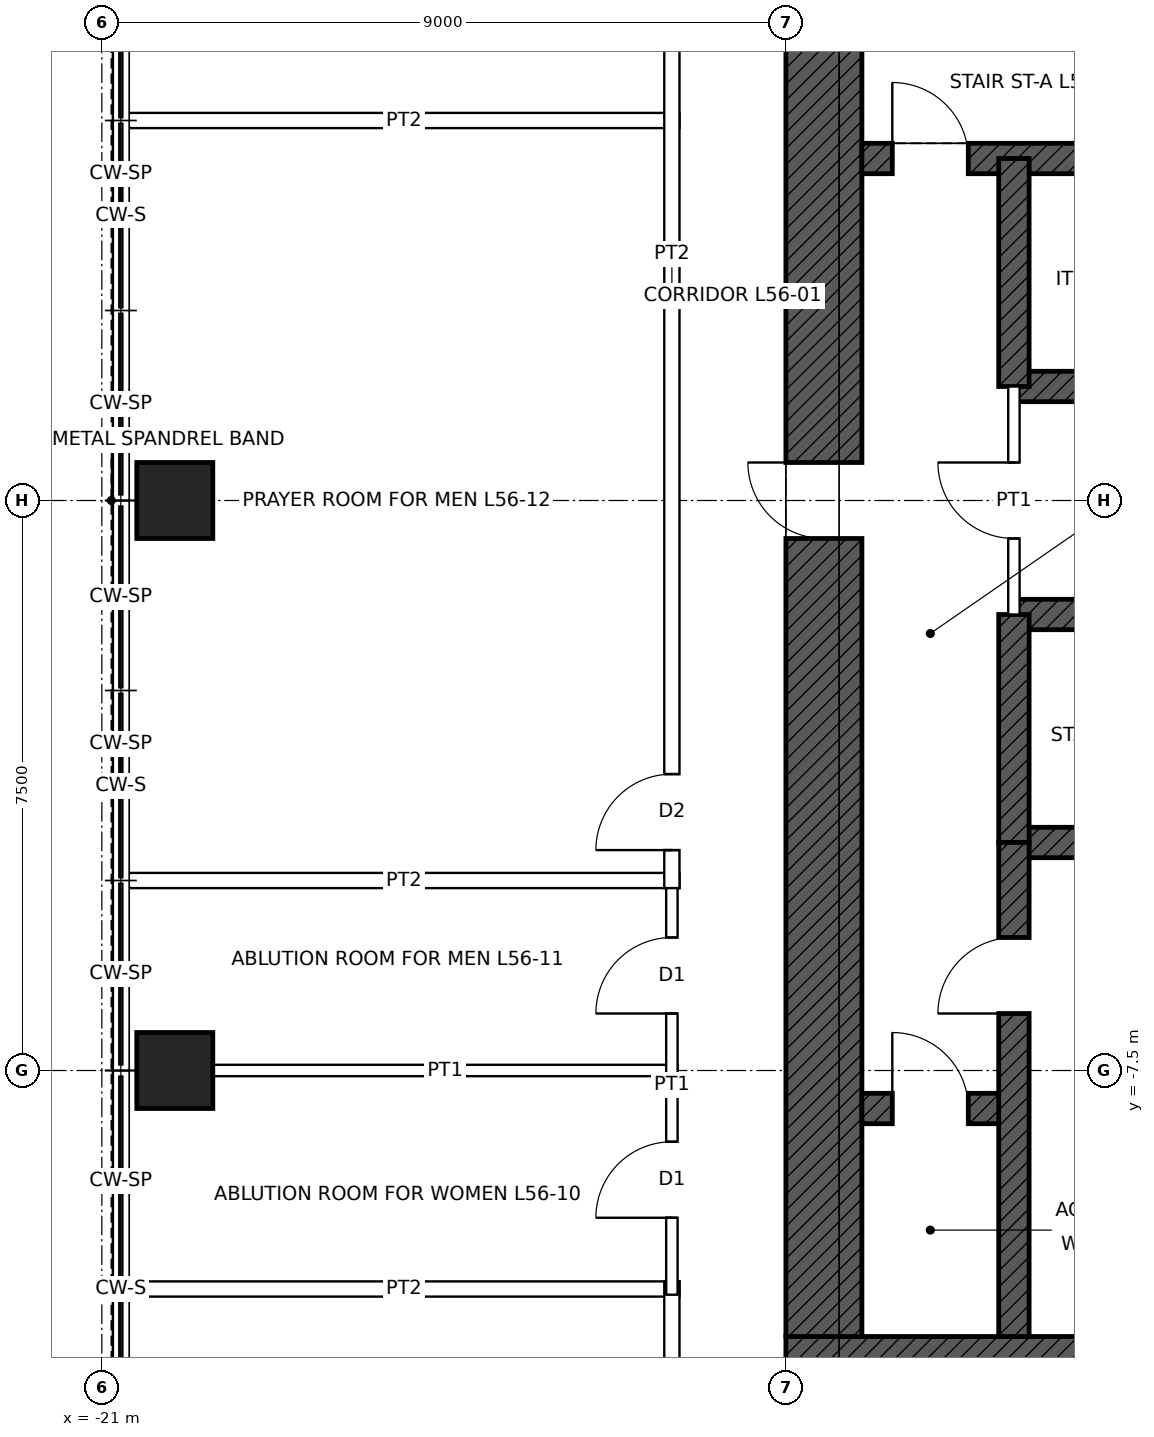
"""IFC4 building model, lengths in metres.
Left out: names, types, materials, properties, quantities, classifications, styles, units other than length and angle.
Written with IfcOpenShell. Run it as: python <this file> out.ifc"""

import sys

from ifc_helpers import new_model, si_unit, direction, frame, frame_2d, origin, origin_2d, place, context, subcontext, project, spatial, rectangle, hollow_rectangle, extrude, element, fill, save


model = new_model("IFC4")
c1 = context("Model", 3, precision=1e-05, world=origin(), true_north=direction((0.0, 1.0)))
c2 = subcontext(c1, "Body", "Model", "MODEL_VIEW")
j1 = project(units=[si_unit("LENGTHUNIT", "METRE"), si_unit("PLANEANGLEUNIT", "RADIAN")], contexts=[c1])
p1 = place(None, origin())
s1 = spatial("IfcSite", under=j1, at=p1, CompositionType="ELEMENT")
p2 = place(p1, origin())
s2 = spatial("IfcBuilding", under=s1, at=p2, CompositionType="ELEMENT")
p3 = place(p2, frame((0.0, 0.0, 259.9)))
s3 = spatial("IfcBuildingStorey", under=s2, at=p3, CompositionType="ELEMENT", Elevation=259.9)
for number, where, z_axis, x_axis in (
    (1, (-20.04, -7.5, 0.0), (0.0, 0.0, 1.0), (1.0, 0.0, 0.0)),
    (2, (-20.04, 0.0, 0.0), (0.0, 0.0, 1.0), (1.0, 0.0, 0.0)),
):
    element("IfcColumn", number, at=place(p3, frame(where, z_axis=z_axis, x_axis=x_axis)), inside=s3, PredefinedType="COLUMN", context=c2, shape_type="SweptSolid", body=[
        extrude(hollow_rectangle(XDim=1.0, YDim=1.0, WallThickness=0.075, at=origin_2d()), origin(), (0.0, 0.0, 1.0), 4.0),
    ])
p4 = place(p3, frame((12.0, -11.5, 0.0), z_axis=(0.0, 0.0, 1.0), x_axis=(-1.0, 0.0, 0.0)))
e3 = element("IfcWall", 3, at=p4, inside=s3, PredefinedType="SHEAR", context=c2, shape_type="SweptSolid", body=[
    extrude(rectangle(XDim=24.0, YDim=1.0, at=frame_2d((12.0, 0.0))), origin(), (0.0, 0.0, 1.0), 4.0),
])
p5 = place(p4, frame((11.5, 0.0, 0.0)))
e4 = element("IfcOpeningElement", 4, at=p5, cuts=e3, PredefinedType="OPENING", context=c2, shape_type="SweptSolid", body=[
    extrude(rectangle(XDim=1.0, YDim=2.1, at=frame_2d((0.5, 1.05))), frame((0.0, 0.51, 0.0), z_axis=(0.0, -1.0, 0.0), x_axis=(1.0, 0.0, 0.0)), (0.0, 0.0, 1.0), 1.02),
])
p6 = place(p4, frame((1.0, 0.0, 0.0)))
e5 = element("IfcOpeningElement", 5, at=p6, cuts=e3, PredefinedType="OPENING", context=c2, shape_type="SweptSolid", body=[
    extrude(rectangle(XDim=1.0, YDim=2.4, at=frame_2d((0.5, 1.2))), frame((0.0, 0.51, 0.0), z_axis=(0.0, -1.0, 0.0), x_axis=(1.0, 0.0, 0.0)), (0.0, 0.0, 1.0), 1.02),
])
p7 = place(p3, frame((-11.5, -11.0, 0.0), z_axis=(0.0, 0.0, 1.0), x_axis=(0.0, 1.0, 0.0)))
e6 = element("IfcWall", 6, at=p7, inside=s3, PredefinedType="SHEAR", context=c2, shape_type="SweptSolid", body=[
    extrude(rectangle(XDim=22.0, YDim=1.0, at=frame_2d((11.0, 0.0))), origin(), (0.0, 0.0, 1.0), 4.0),
])
p8 = place(p7, frame((10.5, 0.0, 0.0)))
e7 = element("IfcOpeningElement", 7, at=p8, cuts=e6, PredefinedType="OPENING", context=c2, shape_type="SweptSolid", body=[
    extrude(rectangle(XDim=1.0, YDim=2.4, at=frame_2d((0.5, 1.2))), frame((0.0, 0.51, 0.0), z_axis=(0.0, -1.0, 0.0), x_axis=(1.0, 0.0, 0.0)), (0.0, 0.0, 1.0), 1.02),
])
p9 = place(p3, frame((-11.0, 4.5, 0.0), z_axis=(0.0, 0.0, 1.0), x_axis=(1.0, 0.0, 0.0)))
e8 = element("IfcWall", 8, at=p9, inside=s3, PredefinedType="SHEAR", context=c2, shape_type="SweptSolid", body=[
    extrude(rectangle(XDim=22.0, YDim=0.4, at=frame_2d((11.0, 0.0))), origin(), (0.0, 0.0, 1.0), 4.0),
])
p10 = place(p9, frame((0.4, 0.0, 0.0)))
e9 = element("IfcOpeningElement", 9, at=p10, cuts=e8, PredefinedType="OPENING", context=c2, shape_type="SweptSolid", body=[
    extrude(rectangle(XDim=1.0, YDim=2.1, at=frame_2d((0.5, 1.05))), frame((0.0, 0.21, 0.0), z_axis=(0.0, -1.0, 0.0), x_axis=(1.0, 0.0, 0.0)), (0.0, 0.0, 1.0), 0.42),
])
p11 = place(p9, frame((20.6, 0.0, 0.0)))
e10 = element("IfcOpeningElement", 10, at=p11, cuts=e8, PredefinedType="OPENING", context=c2, shape_type="SweptSolid", body=[
    extrude(rectangle(XDim=1.0, YDim=2.1, at=frame_2d((0.5, 1.05))), frame((0.0, 0.21, 0.0), z_axis=(0.0, -1.0, 0.0), x_axis=(1.0, 0.0, 0.0)), (0.0, 0.0, 1.0), 0.42),
])
p12 = place(p3, frame((-9.0, 1.5, 0.0), z_axis=(0.0, 0.0, 1.0), x_axis=(1.0, 0.0, 0.0)))
e11 = element("IfcWall", 11, at=p12, inside=s3, PredefinedType="SHEAR", context=c2, shape_type="SweptSolid", body=[
    extrude(rectangle(XDim=18.0, YDim=0.4, at=frame_2d((9.0, 0.0))), origin(), (0.0, 0.0, 1.0), 4.0),
])
p13 = place(p12, frame((0.95, 0.0, 0.0)))
e12 = element("IfcOpeningElement", 12, at=p13, cuts=e11, PredefinedType="OPENING", context=c2, shape_type="SweptSolid", body=[
    extrude(rectangle(XDim=1.1, YDim=2.1, at=frame_2d((0.55, 1.05))), frame((0.0, 0.21, 0.0), z_axis=(0.0, -1.0, 0.0), x_axis=(1.0, 0.0, 0.0)), (0.0, 0.0, 1.0), 0.42),
])
p14 = place(p12, frame((3.95, 0.0, 0.0)))
e13 = element("IfcOpeningElement", 13, at=p14, cuts=e11, PredefinedType="OPENING", context=c2, shape_type="SweptSolid", body=[
    extrude(rectangle(XDim=1.1, YDim=2.1, at=frame_2d((0.55, 1.05))), frame((0.0, 0.21, 0.0), z_axis=(0.0, -1.0, 0.0), x_axis=(1.0, 0.0, 0.0)), (0.0, 0.0, 1.0), 0.42),
])
p15 = place(p12, frame((6.95, 0.0, 0.0)))
e14 = element("IfcOpeningElement", 14, at=p15, cuts=e11, PredefinedType="OPENING", context=c2, shape_type="SweptSolid", body=[
    extrude(rectangle(XDim=1.1, YDim=2.1, at=frame_2d((0.55, 1.05))), frame((0.0, 0.21, 0.0), z_axis=(0.0, -1.0, 0.0), x_axis=(1.0, 0.0, 0.0)), (0.0, 0.0, 1.0), 0.42),
])
p16 = place(p12, frame((9.95, 0.0, 0.0)))
e15 = element("IfcOpeningElement", 15, at=p16, cuts=e11, PredefinedType="OPENING", context=c2, shape_type="SweptSolid", body=[
    extrude(rectangle(XDim=1.1, YDim=2.1, at=frame_2d((0.55, 1.05))), frame((0.0, 0.21, 0.0), z_axis=(0.0, -1.0, 0.0), x_axis=(1.0, 0.0, 0.0)), (0.0, 0.0, 1.0), 0.42),
])
p17 = place(p12, frame((12.95, 0.0, 0.0)))
e16 = element("IfcOpeningElement", 16, at=p17, cuts=e11, PredefinedType="OPENING", context=c2, shape_type="SweptSolid", body=[
    extrude(rectangle(XDim=1.1, YDim=2.1, at=frame_2d((0.55, 1.05))), frame((0.0, 0.21, 0.0), z_axis=(0.0, -1.0, 0.0), x_axis=(1.0, 0.0, 0.0)), (0.0, 0.0, 1.0), 0.42),
])
p18 = place(p12, frame((15.95, 0.0, 0.0)))
e17 = element("IfcOpeningElement", 17, at=p18, cuts=e11, PredefinedType="OPENING", context=c2, shape_type="SweptSolid", body=[
    extrude(rectangle(XDim=1.1, YDim=2.1, at=frame_2d((0.55, 1.05))), frame((0.0, 0.21, 0.0), z_axis=(0.0, -1.0, 0.0), x_axis=(1.0, 0.0, 0.0)), (0.0, 0.0, 1.0), 0.42),
])
p19 = place(p3, frame((-9.0, -1.5, 0.0), z_axis=(0.0, 0.0, 1.0), x_axis=(1.0, 0.0, 0.0)))
e18 = element("IfcWall", 18, at=p19, inside=s3, PredefinedType="SHEAR", context=c2, shape_type="SweptSolid", body=[
    extrude(rectangle(XDim=18.0, YDim=0.4, at=frame_2d((9.0, 0.0))), origin(), (0.0, 0.0, 1.0), 4.0),
])
p20 = place(p19, frame((9.95, 0.0, 0.0)))
e19 = element("IfcOpeningElement", 19, at=p20, cuts=e18, PredefinedType="OPENING", context=c2, shape_type="SweptSolid", body=[
    extrude(rectangle(XDim=1.1, YDim=2.1, at=frame_2d((0.55, 1.05))), frame((0.0, 0.21, 0.0), z_axis=(0.0, -1.0, 0.0), x_axis=(1.0, 0.0, 0.0)), (0.0, 0.0, 1.0), 0.42),
])
p21 = place(p19, frame((12.95, 0.0, 0.0)))
e20 = element("IfcOpeningElement", 20, at=p21, cuts=e18, PredefinedType="OPENING", context=c2, shape_type="SweptSolid", body=[
    extrude(rectangle(XDim=1.1, YDim=2.1, at=frame_2d((0.55, 1.05))), frame((0.0, 0.21, 0.0), z_axis=(0.0, -1.0, 0.0), x_axis=(1.0, 0.0, 0.0)), (0.0, 0.0, 1.0), 0.42),
])
p22 = place(p19, frame((15.95, 0.0, 0.0)))
e21 = element("IfcOpeningElement", 21, at=p22, cuts=e18, PredefinedType="OPENING", context=c2, shape_type="SweptSolid", body=[
    extrude(rectangle(XDim=1.1, YDim=2.1, at=frame_2d((0.55, 1.05))), frame((0.0, 0.21, 0.0), z_axis=(0.0, -1.0, 0.0), x_axis=(1.0, 0.0, 0.0)), (0.0, 0.0, 1.0), 0.42),
])
p23 = place(p19, frame((0.95, 0.0, 0.0)))
e22 = element("IfcOpeningElement", 22, at=p23, cuts=e18, PredefinedType="OPENING", context=c2, shape_type="SweptSolid", body=[
    extrude(rectangle(XDim=1.1, YDim=2.1, at=frame_2d((0.55, 1.05))), frame((0.0, 0.21, 0.0), z_axis=(0.0, -1.0, 0.0), x_axis=(1.0, 0.0, 0.0)), (0.0, 0.0, 1.0), 0.42),
])
p24 = place(p19, frame((3.95, 0.0, 0.0)))
e23 = element("IfcOpeningElement", 23, at=p24, cuts=e18, PredefinedType="OPENING", context=c2, shape_type="SweptSolid", body=[
    extrude(rectangle(XDim=1.1, YDim=2.1, at=frame_2d((0.55, 1.05))), frame((0.0, 0.21, 0.0), z_axis=(0.0, -1.0, 0.0), x_axis=(1.0, 0.0, 0.0)), (0.0, 0.0, 1.0), 0.42),
])
p25 = place(p19, frame((6.95, 0.0, 0.0)))
e24 = element("IfcOpeningElement", 24, at=p25, cuts=e18, PredefinedType="OPENING", context=c2, shape_type="SweptSolid", body=[
    extrude(rectangle(XDim=1.1, YDim=2.1, at=frame_2d((0.55, 1.05))), frame((0.0, 0.21, 0.0), z_axis=(0.0, -1.0, 0.0), x_axis=(1.0, 0.0, 0.0)), (0.0, 0.0, 1.0), 0.42),
])
p26 = place(p3, frame((-9.0, -4.5, 0.0), z_axis=(0.0, 0.0, 1.0), x_axis=(1.0, 0.0, 0.0)))
e25 = element("IfcWall", 25, at=p26, inside=s3, PredefinedType="SHEAR", context=c2, shape_type="SweptSolid", body=[
    extrude(rectangle(XDim=18.0, YDim=0.4, at=frame_2d((9.0, 0.0))), origin(), (0.0, 0.0, 1.0), 4.0),
])
p27 = place(p3, frame((-11.0, -8.0, 0.0), z_axis=(0.0, 0.0, 1.0), x_axis=(1.0, 0.0, 0.0)))
e26 = element("IfcWall", 26, at=p27, inside=s3, PredefinedType="SHEAR", context=c2, shape_type="SweptSolid", body=[
    extrude(rectangle(XDim=2.0, YDim=0.4, at=frame_2d((1.0, 0.0))), origin(), (0.0, 0.0, 1.0), 4.0),
])
p28 = place(p27, frame((0.4, 0.0, 0.0)))
e27 = element("IfcOpeningElement", 27, at=p28, cuts=e26, PredefinedType="OPENING", context=c2, shape_type="SweptSolid", body=[
    extrude(rectangle(XDim=1.0, YDim=2.1, at=frame_2d((0.5, 1.05))), frame((0.0, 0.21, 0.0), z_axis=(0.0, -1.0, 0.0), x_axis=(1.0, 0.0, 0.0)), (0.0, 0.0, 1.0), 0.42),
])
for number, where, z_axis, x_axis in (
    (28, (-9.0, 1.5, 0.0), (0.0, 0.0, 1.0), (0.0, 1.0, 0.0)),
    (29, (-9.0, -4.5, 0.0), (0.0, 0.0, 1.0), (0.0, 1.0, 0.0)),
):
    element("IfcWall", number, at=place(p3, frame(where, z_axis=z_axis, x_axis=x_axis)), inside=s3, PredefinedType="SHEAR", context=c2, shape_type="SweptSolid", body=[
        extrude(rectangle(XDim=3.0, YDim=0.4, at=frame_2d((1.5, 0.0))), origin(), (0.0, 0.0, 1.0), 4.0),
    ])
p29 = place(p3, frame((-9.0, -11.0, 0.0), z_axis=(0.0, 0.0, 1.0), x_axis=(0.0, 1.0, 0.0)))
e30 = element("IfcWall", 30, at=p29, inside=s3, PredefinedType="SHEAR", context=c2, shape_type="SweptSolid", body=[
    extrude(rectangle(XDim=6.5, YDim=0.4, at=frame_2d((3.25, 0.0))), origin(), (0.0, 0.0, 1.0), 4.0),
])
p30 = place(p29, frame((4.25, 0.0, 0.0)))
e31 = element("IfcOpeningElement", 31, at=p30, cuts=e30, PredefinedType="OPENING", context=c2, shape_type="SweptSolid", body=[
    extrude(rectangle(XDim=1.0, YDim=2.1, at=frame_2d((0.5, 1.05))), frame((0.0, 0.21, 0.0), z_axis=(0.0, -1.0, 0.0), x_axis=(1.0, 0.0, 0.0)), (0.0, 0.0, 1.0), 0.42),
])
p31 = place(p3, frame((-20.65, -10.375, 0.0), z_axis=(0.0, 0.0, 1.0), x_axis=(1.0, 0.0, 0.0)))
e32 = element("IfcWall", 32, at=p31, inside=s3, PredefinedType="PARTITIONING", context=c2, shape_type="SweptSolid", body=[
    extrude(rectangle(XDim=7.25, YDim=0.2, at=frame_2d((3.625, 0.0))), origin(), (0.0, 0.0, 1.0), 3.85),
])
p32 = place(p3, frame((-19.54, -7.5, 0.0), z_axis=(0.0, 0.0, 1.0), x_axis=(1.0, 0.0, 0.0)))
e33 = element("IfcWall", 33, at=p32, inside=s3, PredefinedType="PARTITIONING", context=c2, shape_type="SweptSolid", body=[
    extrude(rectangle(XDim=6.115, YDim=0.15, at=frame_2d((3.058, 0.0))), origin(), (0.0, 0.0, 1.0), 3.243),
])
for number, where, z_axis, x_axis in (
    (34, (-20.65, -5.0, 0.0), (0.0, 0.0, 1.0), (1.0, 0.0, 0.0)),
    (35, (-20.65, 5.0, 0.0), (0.0, 0.0, 1.0), (1.0, 0.0, 0.0)),
):
    element("IfcWall", number, at=place(p3, frame(where, z_axis=z_axis, x_axis=x_axis)), inside=s3, PredefinedType="PARTITIONING", context=c2, shape_type="SweptSolid", body=[
        extrude(rectangle(XDim=7.25, YDim=0.2, at=frame_2d((3.625, 0.0))), origin(), (0.0, 0.0, 1.0), 3.85),
    ])
p33 = place(p3, frame((-13.5, -13.6, 0.0), z_axis=(0.0, 0.0, 1.0), x_axis=(0.0, 1.0, 0.0)))
e36 = element("IfcWall", 36, at=p33, inside=s3, PredefinedType="PARTITIONING", context=c2, shape_type="SweptSolid", body=[
    extrude(rectangle(XDim=3.325, YDim=0.2, at=frame_2d((1.663, 0.0))), origin(), (0.0, 0.0, 1.0), 3.85),
])
p34 = place(p3, frame((-13.5, -10.45, 0.0), z_axis=(0.0, 0.0, 1.0), x_axis=(0.0, 1.0, 0.0)))
e37 = element("IfcWall", 37, at=p34, inside=s3, PredefinedType="PARTITIONING", context=c2, shape_type="SweptSolid", body=[
    extrude(rectangle(XDim=5.525, YDim=0.15, at=frame_2d((2.762, 0.0))), origin(), (0.0, 0.0, 1.0), 3.85),
])
p35 = place(p34, frame((1.012, 0.0, 0.0)))
e38 = element("IfcOpeningElement", 38, at=p35, cuts=e37, PredefinedType="OPENING", context=c2, shape_type="SweptSolid", body=[
    extrude(rectangle(XDim=1.0, YDim=2.1, at=frame_2d((0.5, 1.05))), frame((0.0, 0.085, 0.0), z_axis=(0.0, -1.0, 0.0), x_axis=(1.0, 0.0, 0.0)), (0.0, 0.0, 1.0), 0.17),
])
p36 = place(p34, frame((3.7, 0.0, 0.0)))
e39 = element("IfcOpeningElement", 39, at=p36, cuts=e37, PredefinedType="OPENING", context=c2, shape_type="SweptSolid", body=[
    extrude(rectangle(XDim=1.0, YDim=2.1, at=frame_2d((0.5, 1.05))), frame((0.0, 0.085, 0.0), z_axis=(0.0, -1.0, 0.0), x_axis=(1.0, 0.0, 0.0)), (0.0, 0.0, 1.0), 0.17),
])
p37 = place(p3, frame((-13.5, -5.1, 0.0), z_axis=(0.0, 0.0, 1.0), x_axis=(0.0, 1.0, 0.0)))
e40 = element("IfcWall", 40, at=p37, inside=s3, PredefinedType="PARTITIONING", context=c2, shape_type="SweptSolid", body=[
    extrude(rectangle(XDim=15.575, YDim=0.2, at=frame_2d((7.788, 0.0))), origin(), (0.0, 0.0, 1.0), 3.85),
])
p38 = place(p37, frame((0.5, 0.0, 0.0)))
e41 = element("IfcOpeningElement", 41, at=p38, cuts=e40, PredefinedType="OPENING", context=c2, shape_type="SweptSolid", body=[
    extrude(rectangle(XDim=1.0, YDim=2.1, at=frame_2d((0.5, 1.05))), frame((0.0, 0.11, 0.0), z_axis=(0.0, -1.0, 0.0), x_axis=(1.0, 0.0, 0.0)), (0.0, 0.0, 1.0), 0.22),
])
p39 = place(p37, frame((12.288, 0.0, 0.0)))
e42 = element("IfcOpeningElement", 42, at=p39, cuts=e40, PredefinedType="OPENING", context=c2, shape_type="SweptSolid", body=[
    extrude(rectangle(XDim=1.0, YDim=2.1, at=frame_2d((0.5, 1.05))), frame((0.0, 0.11, 0.0), z_axis=(0.0, -1.0, 0.0), x_axis=(1.0, 0.0, 0.0)), (0.0, 0.0, 1.0), 0.22),
])
p40 = place(p3, frame((-9.0, -1.5, 0.0), z_axis=(0.0, 0.0, 1.0), x_axis=(0.0, 1.0, 0.0)))
e43 = element("IfcWall", 43, at=p40, inside=s3, PredefinedType="PARTITIONING", context=c2, shape_type="SweptSolid", body=[
    extrude(rectangle(XDim=3.0, YDim=0.15, at=frame_2d((1.5, 0.0))), origin(), (0.0, 0.0, 1.0), 3.75),
])
p41 = place(p40, frame((1.0, 0.0, 0.0)))
e44 = element("IfcOpeningElement", 44, at=p41, cuts=e43, PredefinedType="OPENING", context=c2, shape_type="SweptSolid", body=[
    extrude(rectangle(XDim=1.0, YDim=2.4, at=frame_2d((0.5, 1.2))), frame((0.0, 0.085, 0.0), z_axis=(0.0, -1.0, 0.0), x_axis=(1.0, 0.0, 0.0)), (0.0, 0.0, 1.0), 0.17),
])
p42 = place(p10, origin())
e45 = element("IfcDoor", 45, at=p42, inside=s3, OperationType="SINGLE_SWING_LEFT", PredefinedType="DOOR", context=c2, shape_type="SweptSolid", body=[
    extrude(rectangle(XDim=1.0, YDim=2.1, at=frame_2d((0.5, 1.05))), frame((0.0, 0.025, 0.0), z_axis=(0.0, -1.0, 0.0), x_axis=(1.0, 0.0, 0.0)), (0.0, 0.0, 1.0), 0.05),
])
fill(e9, e45)
p43 = place(p8, origin())
e46 = element("IfcDoor", 46, at=p43, inside=s3, OperationType="SINGLE_SWING_RIGHT", PredefinedType="DOOR", context=c2, shape_type="SweptSolid", body=[
    extrude(rectangle(XDim=1.0, YDim=2.4, at=frame_2d((0.5, 1.2))), frame((0.0, 0.485, 0.0), z_axis=(0.0, -1.0, 0.0), x_axis=(1.0, 0.0, 0.0)), (0.0, 0.0, 1.0), 0.05),
])
fill(e7, e46)
p44 = place(p30, origin())
e47 = element("IfcDoor", 47, at=p44, inside=s3, OperationType="SINGLE_SWING_LEFT", PredefinedType="DOOR", context=c2, shape_type="SweptSolid", body=[
    extrude(rectangle(XDim=1.0, YDim=2.1, at=frame_2d((0.5, 1.05))), frame((0.0, 0.025, 0.0), z_axis=(0.0, -1.0, 0.0), x_axis=(1.0, 0.0, 0.0)), (0.0, 0.0, 1.0), 0.05),
])
fill(e31, e47)
p45 = place(p28, origin())
e48 = element("IfcDoor", 48, at=p45, inside=s3, OperationType="SINGLE_SWING_LEFT", PredefinedType="DOOR", context=c2, shape_type="SweptSolid", body=[
    extrude(rectangle(XDim=1.0, YDim=2.1, at=frame_2d((0.5, 1.05))), frame((0.0, 0.025, 0.0), z_axis=(0.0, -1.0, 0.0), x_axis=(1.0, 0.0, 0.0)), (0.0, 0.0, 1.0), 0.05),
])
fill(e27, e48)
p46 = place(p41, origin())
e49 = element("IfcDoor", 49, at=p46, inside=s3, OperationType="SINGLE_SWING_RIGHT", PredefinedType="DOOR", context=c2, shape_type="SweptSolid", body=[
    extrude(rectangle(XDim=1.0, YDim=2.4, at=frame_2d((0.5, 1.2))), frame((0.0, 0.025, 0.0), z_axis=(0.0, -1.0, 0.0), x_axis=(1.0, 0.0, 0.0)), (0.0, 0.0, 1.0), 0.05),
])
fill(e44, e49)
p47 = place(p35, origin())
e50 = element("IfcDoor", 50, at=p47, inside=s3, OperationType="SINGLE_SWING_LEFT", PredefinedType="DOOR", context=c2, shape_type="SweptSolid", body=[
    extrude(rectangle(XDim=1.0, YDim=2.1, at=frame_2d((0.5, 1.05))), frame((0.0, 0.025, 0.0), z_axis=(0.0, -1.0, 0.0), x_axis=(1.0, 0.0, 0.0)), (0.0, 0.0, 1.0), 0.05),
])
fill(e38, e50)
p48 = place(p36, origin())
e51 = element("IfcDoor", 51, at=p48, inside=s3, OperationType="SINGLE_SWING_LEFT", PredefinedType="DOOR", context=c2, shape_type="SweptSolid", body=[
    extrude(rectangle(XDim=1.0, YDim=2.1, at=frame_2d((0.5, 1.05))), frame((0.0, 0.025, 0.0), z_axis=(0.0, -1.0, 0.0), x_axis=(1.0, 0.0, 0.0)), (0.0, 0.0, 1.0), 0.05),
])
fill(e39, e51)
p49 = place(p38, origin())
e52 = element("IfcDoor", 52, at=p49, inside=s3, OperationType="SINGLE_SWING_LEFT", PredefinedType="DOOR", context=c2, shape_type="SweptSolid", body=[
    extrude(rectangle(XDim=1.0, YDim=2.1, at=frame_2d((0.5, 1.05))), frame((0.0, 0.025, 0.0), z_axis=(0.0, -1.0, 0.0), x_axis=(1.0, 0.0, 0.0)), (0.0, 0.0, 1.0), 0.05),
])
fill(e41, e52)
save(model, sys.argv[1])
